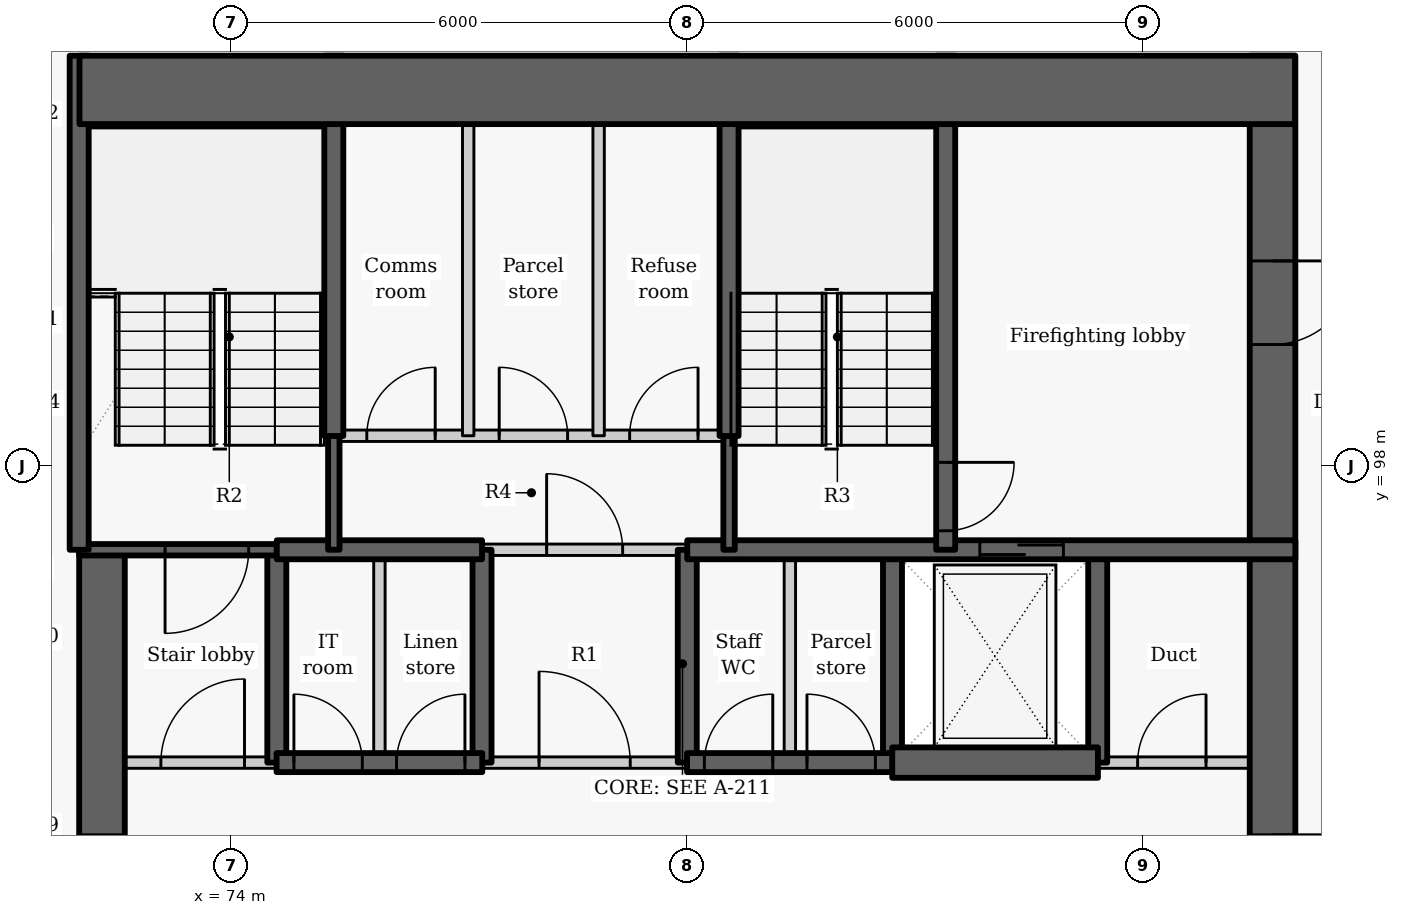
"""IFC4 building model, lengths in metres.
Left out: names, types, materials, properties, quantities, classifications, styles, units other than length and angle.
Written with IfcOpenShell. Run it as: python <this file> out.ifc"""

import sys

from ifc_helpers import new_model, si_unit, direction, frame, frame_2d, origin, place, context, subcontext, project, spatial, rectangle, extrude, element, fill, save


model = new_model("IFC4")
c1 = context("Model", 3, precision=1e-05, world=origin(), true_north=direction((0.0, 1.0)))
c2 = subcontext(c1, "Body", "Model", "MODEL_VIEW")
j1 = project(units=[si_unit("LENGTHUNIT", "METRE"), si_unit("PLANEANGLEUNIT", "RADIAN")], contexts=[c1])
p1 = place(None, origin())
s1 = spatial("IfcSite", under=j1, at=p1, CompositionType="ELEMENT")
p2 = place(p1, origin())
s2 = spatial("IfcBuilding", under=s1, at=p2, CompositionType="ELEMENT")
p3 = place(p2, frame((0.0, 0.0, 44.7)))
s3 = spatial("IfcBuildingStorey", under=s2, at=p3, CompositionType="ELEMENT", Elevation=44.7)
p4 = place(p3, frame((74.6, 94.1, -0.275), z_axis=(0.0, 0.0, 1.0), x_axis=(0.0, 1.0, 0.0)))
e1 = element("IfcWall", 1, at=p4, inside=s3, PredefinedType="SHEAR", context=c2, shape_type="SweptSolid", body=[
    extrude(rectangle(XDim=2.8, YDim=0.25, at=frame_2d((1.4, 0.0))), origin(), (0.0, 0.0, 1.0), 3.3),
])
p5 = place(p3, frame((72.3, 87.8, -0.275), z_axis=(0.0, 0.0, 1.0), x_axis=(0.0, 1.0, 0.0)))
e2 = element("IfcWall", 2, at=p5, inside=s3, PredefinedType="SHEAR", context=c2, shape_type="SweptSolid", body=[
    extrude(rectangle(XDim=9.1, YDim=0.6, at=frame_2d((4.55, 0.0))), origin(), (0.0, 0.0, 1.0), 3.3),
])
p6 = place(p5, frame((3.85, 0.0, 0.275)))
e3 = element("IfcOpeningElement", 3, at=p6, cuts=e2, PredefinedType="OPENING", context=c2, shape_type="SweptSolid", body=[
    extrude(rectangle(XDim=1.5, YDim=2.1, at=frame_2d((0.75, 1.05))), frame((0.0, 0.31, 0.0), z_axis=(0.0, -1.0, 0.0), x_axis=(1.0, 0.0, 0.0)), (0.0, 0.0, 1.0), 0.62),
])
for number, where, z_axis, x_axis in (
    (4, (77.3, 94.1, -0.275), (0.0, 0.0, 1.0), (0.0, 1.0, 0.0)),
    (5, (80.0, 94.1, -0.275), (0.0, 0.0, 1.0), (0.0, 1.0, 0.0)),
    (6, (82.7, 94.1, -0.275), (0.0, 0.0, 1.0), (0.0, 1.0, 0.0)),
    (7, (85.4, 94.1, -0.275), (0.0, 0.0, 1.0), (0.0, 1.0, 0.0)),
):
    element("IfcWall", number, at=place(p3, frame(where, z_axis=z_axis, x_axis=x_axis)), inside=s3, PredefinedType="SHEAR", context=c2, shape_type="SweptSolid", body=[
        extrude(rectangle(XDim=2.8, YDim=0.25, at=frame_2d((1.4, 0.0))), origin(), (0.0, 0.0, 1.0), 3.3),
    ])
p7 = place(p3, frame((87.7, 103.4, -0.275), z_axis=(0.0, 0.0, 1.0), x_axis=(0.0, -1.0, 0.0)))
e8 = element("IfcWall", 8, at=p7, inside=s3, PredefinedType="SHEAR", context=c2, shape_type="SweptSolid", body=[
    extrude(rectangle(XDim=15.6, YDim=0.6, at=frame_2d((7.8, 0.0))), origin(), (0.0, 0.0, 1.0), 3.3),
])
p8 = place(p7, frame((10.25, 0.0, 0.275)))
e9 = element("IfcOpeningElement", 9, at=p8, cuts=e8, PredefinedType="OPENING", context=c2, shape_type="SweptSolid", body=[
    extrude(rectangle(XDim=1.5, YDim=2.1, at=frame_2d((0.75, 1.05))), frame((0.0, 0.31, 0.0), z_axis=(0.0, -1.0, 0.0), x_axis=(1.0, 0.0, 0.0)), (0.0, 0.0, 1.0), 0.62),
])
p9 = place(p7, frame((2.7, 0.0, 0.275)))
e10 = element("IfcOpeningElement", 10, at=p9, cuts=e8, PredefinedType="OPENING", context=c2, shape_type="SweptSolid", body=[
    extrude(rectangle(XDim=1.1, YDim=2.1, at=frame_2d((0.55, 1.05))), frame((0.0, 0.31, 0.0), z_axis=(0.0, -1.0, 0.0), x_axis=(1.0, 0.0, 0.0)), (0.0, 0.0, 1.0), 0.62),
])
p10 = place(p3, frame((72.0, 94.1, 0.0), z_axis=(0.0, 0.0, 1.0), x_axis=(1.0, 0.0, 0.0)))
e11 = element("IfcWall", 11, at=p10, inside=s3, PredefinedType="PARTITIONING", context=c2, shape_type="SweptSolid", body=[
    extrude(rectangle(XDim=2.603, YDim=0.15, at=frame_2d((1.302, 0.0))), origin(), (0.0, 0.0, 1.0), 3.025),
])
p11 = place(p10, frame((1.075, 0.0, 0.0)))
e12 = element("IfcOpeningElement", 12, at=p11, cuts=e11, PredefinedType="OPENING", context=c2, shape_type="SweptSolid", body=[
    extrude(rectangle(XDim=1.1, YDim=2.1, at=frame_2d((0.55, 1.05))), frame((0.0, 0.085, 0.0), z_axis=(0.0, -1.0, 0.0), x_axis=(1.0, 0.0, 0.0)), (0.0, 0.0, 1.0), 0.17),
])
p12 = place(p3, frame((77.297, 94.1, 0.0), z_axis=(0.0, 0.0, 1.0), x_axis=(1.0, 0.0, 0.0)))
e13 = element("IfcWall", 13, at=p12, inside=s3, PredefinedType="PARTITIONING", context=c2, shape_type="SweptSolid", body=[
    extrude(rectangle(XDim=2.706, YDim=0.15, at=frame_2d((1.353, 0.0))), origin(), (0.0, 0.0, 1.0), 3.025),
])
p13 = place(p12, frame((0.753, 0.0, 0.0)))
e14 = element("IfcOpeningElement", 14, at=p13, cuts=e13, PredefinedType="OPENING", context=c2, shape_type="SweptSolid", body=[
    extrude(rectangle(XDim=1.2, YDim=2.1, at=frame_2d((0.6, 1.05))), frame((0.0, 0.085, 0.0), z_axis=(0.0, -1.0, 0.0), x_axis=(1.0, 0.0, 0.0)), (0.0, 0.0, 1.0), 0.17),
])
p14 = place(p3, frame((85.397, 94.1, 0.0), z_axis=(0.0, 0.0, 1.0), x_axis=(1.0, 0.0, 0.0)))
e15 = element("IfcWall", 15, at=p14, inside=s3, PredefinedType="PARTITIONING", context=c2, shape_type="SweptSolid", body=[
    extrude(rectangle(XDim=2.603, YDim=0.15, at=frame_2d((1.302, 0.0))), origin(), (0.0, 0.0, 1.0), 3.025),
])
p15 = place(p14, frame((0.528, 0.0, 0.0)))
e16 = element("IfcOpeningElement", 16, at=p15, cuts=e15, PredefinedType="OPENING", context=c2, shape_type="SweptSolid", body=[
    extrude(rectangle(XDim=0.9, YDim=2.1, at=frame_2d((0.45, 1.05))), frame((0.0, 0.085, 0.0), z_axis=(0.0, -1.0, 0.0), x_axis=(1.0, 0.0, 0.0)), (0.0, 0.0, 1.0), 0.17),
])
p16 = place(p3, frame((74.597, 94.1, -0.275), z_axis=(0.0, 0.0, 1.0), x_axis=(1.0, 0.0, 0.0)))
e17 = element("IfcWall", 17, at=p16, inside=s3, PredefinedType="SHEAR", context=c2, shape_type="SweptSolid", body=[
    extrude(rectangle(XDim=2.706, YDim=0.25, at=frame_2d((1.353, 0.0))), origin(), (0.0, 0.0, 1.0), 3.3),
])
p17 = place(p16, frame((0.228, 0.0, 0.275)))
e18 = element("IfcOpeningElement", 18, at=p17, cuts=e17, PredefinedType="OPENING", context=c2, shape_type="SweptSolid", body=[
    extrude(rectangle(XDim=0.9, YDim=2.1, at=frame_2d((0.45, 1.05))), frame((0.0, 0.135, 0.0), z_axis=(0.0, -1.0, 0.0), x_axis=(1.0, 0.0, 0.0)), (0.0, 0.0, 1.0), 0.27),
])
p18 = place(p16, frame((1.578, 0.0, 0.275)))
e19 = element("IfcOpeningElement", 19, at=p18, cuts=e17, PredefinedType="OPENING", context=c2, shape_type="SweptSolid", body=[
    extrude(rectangle(XDim=0.9, YDim=2.1, at=frame_2d((0.45, 1.05))), frame((0.0, 0.135, 0.0), z_axis=(0.0, -1.0, 0.0), x_axis=(1.0, 0.0, 0.0)), (0.0, 0.0, 1.0), 0.27),
])
p19 = place(p3, frame((79.997, 94.1, -0.275), z_axis=(0.0, 0.0, 1.0), x_axis=(1.0, 0.0, 0.0)))
e20 = element("IfcWall", 20, at=p19, inside=s3, PredefinedType="SHEAR", context=c2, shape_type="SweptSolid", body=[
    extrude(rectangle(XDim=2.706, YDim=0.25, at=frame_2d((1.353, 0.0))), origin(), (0.0, 0.0, 1.0), 3.3),
])
p20 = place(p19, frame((0.228, 0.0, 0.275)))
e21 = element("IfcOpeningElement", 21, at=p20, cuts=e20, PredefinedType="OPENING", context=c2, shape_type="SweptSolid", body=[
    extrude(rectangle(XDim=0.9, YDim=2.1, at=frame_2d((0.45, 1.05))), frame((0.0, 0.135, 0.0), z_axis=(0.0, -1.0, 0.0), x_axis=(1.0, 0.0, 0.0)), (0.0, 0.0, 1.0), 0.27),
])
p21 = place(p19, frame((1.578, 0.0, 0.275)))
e22 = element("IfcOpeningElement", 22, at=p21, cuts=e20, PredefinedType="OPENING", context=c2, shape_type="SweptSolid", body=[
    extrude(rectangle(XDim=0.9, YDim=2.1, at=frame_2d((0.45, 1.05))), frame((0.0, 0.135, 0.0), z_axis=(0.0, -1.0, 0.0), x_axis=(1.0, 0.0, 0.0)), (0.0, 0.0, 1.0), 0.27),
])
p22 = place(p3, frame((82.697, 94.1, -0.275), z_axis=(0.0, 0.0, 1.0), x_axis=(1.0, 0.0, 0.0)))
e23 = element("IfcWall", 23, at=p22, inside=s3, PredefinedType="SHEAR", context=c2, shape_type="SweptSolid", body=[
    extrude(rectangle(XDim=2.706, YDim=0.4, at=frame_2d((1.353, 0.0))), origin(), (0.0, 0.0, 1.0), 3.3),
])
p23 = place(p3, frame((74.6, 96.9, -0.275), z_axis=(0.0, 0.0, 1.0), x_axis=(-1.0, 0.0, 0.0)))
e24 = element("IfcWall", 24, at=p23, inside=s3, PredefinedType="SHEAR", context=c2, shape_type="SweptSolid", body=[
    extrude(rectangle(XDim=2.6, YDim=0.15, at=frame_2d((1.3, 0.0))), origin(), (0.0, 0.0, 1.0), 3.3),
])
p24 = place(p23, frame((0.37, 0.0, 0.275)))
e25 = element("IfcOpeningElement", 25, at=p24, cuts=e24, PredefinedType="OPENING", context=c2, shape_type="SweptSolid", body=[
    extrude(rectangle(XDim=1.1, YDim=2.1, at=frame_2d((0.55, 1.05))), frame((0.0, 0.085, 0.0), z_axis=(0.0, -1.0, 0.0), x_axis=(1.0, 0.0, 0.0)), (0.0, 0.0, 1.0), 0.17),
])
p25 = place(p3, frame((75.95, 94.1, 0.0), z_axis=(0.0, 0.0, 1.0), x_axis=(0.0, 1.0, 0.0)))
e26 = element("IfcWall", 26, at=p25, inside=s3, PredefinedType="PARTITIONING", context=c2, shape_type="SweptSolid", body=[
    extrude(rectangle(XDim=2.8, YDim=0.15, at=frame_2d((1.4, 0.0))), origin(), (0.0, 0.0, 1.0), 3.025),
])
p26 = place(p3, frame((74.6, 96.9, -0.275), z_axis=(0.0, 0.0, 1.0), x_axis=(1.0, 0.0, 0.0)))
e27 = element("IfcWall", 27, at=p26, inside=s3, PredefinedType="SHEAR", context=c2, shape_type="SweptSolid", body=[
    extrude(rectangle(XDim=2.7, YDim=0.25, at=frame_2d((1.35, 0.0))), origin(), (0.0, 0.0, 1.0), 3.3),
])
p27 = place(p3, frame((80.0, 96.9, -0.275), z_axis=(0.0, 0.0, 1.0), x_axis=(1.0, 0.0, 0.0)))
e28 = element("IfcWall", 28, at=p27, inside=s3, PredefinedType="SHEAR", context=c2, shape_type="SweptSolid", body=[
    extrude(rectangle(XDim=8.0, YDim=0.25, at=frame_2d((4.0, 0.0))), origin(), (0.0, 0.0, 1.0), 3.3),
])
p28 = place(p27, frame((3.849, 0.0, 0.275)))
e29 = element("IfcOpeningElement", 29, at=p28, cuts=e28, PredefinedType="OPENING", context=c2, shape_type="SweptSolid", body=[
    extrude(rectangle(XDim=1.1, YDim=2.1, at=frame_2d((0.55, 1.05))), frame((0.0, 0.135, 0.0), z_axis=(0.0, -1.0, 0.0), x_axis=(1.0, 0.0, 0.0)), (0.0, 0.0, 1.0), 0.27),
])
p29 = place(p3, frame((77.3, 96.9, 0.0), z_axis=(0.0, 0.0, 1.0), x_axis=(1.0, 0.0, 0.0)))
e30 = element("IfcWall", 30, at=p29, inside=s3, PredefinedType="PARTITIONING", context=c2, shape_type="SweptSolid", body=[
    extrude(rectangle(XDim=2.7, YDim=0.15, at=frame_2d((1.35, 0.0))), origin(), (0.0, 0.0, 1.0), 3.025),
])
p30 = place(p29, frame((0.85, 0.0, 0.0)))
e31 = element("IfcOpeningElement", 31, at=p30, cuts=e30, PredefinedType="OPENING", context=c2, shape_type="SweptSolid", body=[
    extrude(rectangle(XDim=1.0, YDim=2.1, at=frame_2d((0.5, 1.05))), frame((0.0, 0.085, 0.0), z_axis=(0.0, -1.0, 0.0), x_axis=(1.0, 0.0, 0.0)), (0.0, 0.0, 1.0), 0.17),
])
p31 = place(p3, frame((81.35, 94.1, 0.0), z_axis=(0.0, 0.0, 1.0), x_axis=(0.0, 1.0, 0.0)))
e32 = element("IfcWall", 32, at=p31, inside=s3, PredefinedType="PARTITIONING", context=c2, shape_type="SweptSolid", body=[
    extrude(rectangle(XDim=2.8, YDim=0.15, at=frame_2d((1.4, 0.0))), origin(), (0.0, 0.0, 1.0), 3.025),
])
p32 = place(p3, frame((75.35, 96.9, -0.275), z_axis=(0.0, 0.0, 1.0), x_axis=(0.0, 1.0, 0.0)))
e33 = element("IfcWall", 33, at=p32, inside=s3, PredefinedType="SHEAR", context=c2, shape_type="SweptSolid", body=[
    extrude(rectangle(XDim=1.503, YDim=0.15, at=frame_2d((0.751, 0.0))), origin(), (0.0, 0.0, 1.0), 3.3),
])
p33 = place(p3, frame((75.35, 98.397, -0.275), z_axis=(0.0, 0.0, 1.0), x_axis=(0.0, 1.0, 0.0)))
e34 = element("IfcWall", 34, at=p33, inside=s3, PredefinedType="SHEAR", context=c2, shape_type="SweptSolid", body=[
    extrude(rectangle(XDim=5.003, YDim=0.25, at=frame_2d((2.501, 0.0))), origin(), (0.0, 0.0, 1.0), 3.3),
])
p34 = place(p3, frame((72.0, 96.9, -0.275), z_axis=(0.0, 0.0, 1.0), x_axis=(0.0, 1.0, 0.0)))
e35 = element("IfcWall", 35, at=p34, inside=s3, PredefinedType="SHEAR", context=c2, shape_type="SweptSolid", body=[
    extrude(rectangle(XDim=6.5, YDim=0.25, at=frame_2d((3.25, 0.0))), origin(), (0.0, 0.0, 1.0), 3.3),
])
p35 = place(p3, frame((83.4, 103.4, -0.275), z_axis=(0.0, 0.0, 1.0), x_axis=(0.0, -1.0, 0.0)))
e36 = element("IfcWall", 36, at=p35, inside=s3, PredefinedType="SHEAR", context=c2, shape_type="SweptSolid", body=[
    extrude(rectangle(XDim=6.5, YDim=0.25, at=frame_2d((3.25, 0.0))), origin(), (0.0, 0.0, 1.0), 3.3),
])
p36 = place(p35, frame((5.35, 0.0, 0.275)))
e37 = element("IfcOpeningElement", 37, at=p36, cuts=e36, PredefinedType="OPENING", context=c2, shape_type="SweptSolid", body=[
    extrude(rectangle(XDim=0.9, YDim=2.1, at=frame_2d((0.45, 1.05))), frame((0.0, 0.135, 0.0), z_axis=(0.0, -1.0, 0.0), x_axis=(1.0, 0.0, 0.0)), (0.0, 0.0, 1.0), 0.27),
])
p37 = place(p3, frame((80.55, 96.9, -0.275), z_axis=(0.0, 0.0, 1.0), x_axis=(0.0, 1.0, 0.0)))
e38 = element("IfcWall", 38, at=p37, inside=s3, PredefinedType="SHEAR", context=c2, shape_type="SweptSolid", body=[
    extrude(rectangle(XDim=1.503, YDim=0.15, at=frame_2d((0.751, 0.0))), origin(), (0.0, 0.0, 1.0), 3.3),
])
p38 = place(p3, frame((80.55, 98.397, -0.275), z_axis=(0.0, 0.0, 1.0), x_axis=(0.0, 1.0, 0.0)))
e39 = element("IfcWall", 39, at=p38, inside=s3, PredefinedType="SHEAR", context=c2, shape_type="SweptSolid", body=[
    extrude(rectangle(XDim=5.003, YDim=0.25, at=frame_2d((2.501, 0.0))), origin(), (0.0, 0.0, 1.0), 3.3),
])
p39 = place(p3, frame((75.35, 98.4, 0.0), z_axis=(0.0, 0.0, 1.0), x_axis=(1.0, 0.0, 0.0)))
e40 = element("IfcWall", 40, at=p39, inside=s3, PredefinedType="PARTITIONING", context=c2, shape_type="SweptSolid", body=[
    extrude(rectangle(XDim=5.2, YDim=0.15, at=frame_2d((2.6, 0.0))), origin(), (0.0, 0.0, 1.0), 3.025),
])
p40 = place(p39, frame((0.434, 0.0, 0.0)))
e41 = element("IfcOpeningElement", 41, at=p40, cuts=e40, PredefinedType="OPENING", context=c2, shape_type="SweptSolid", body=[
    extrude(rectangle(XDim=0.9, YDim=2.1, at=frame_2d((0.45, 1.05))), frame((0.0, 0.085, 0.0), z_axis=(0.0, -1.0, 0.0), x_axis=(1.0, 0.0, 0.0)), (0.0, 0.0, 1.0), 0.17),
])
p41 = place(p39, frame((2.176, 0.0, 0.0)))
e42 = element("IfcOpeningElement", 42, at=p41, cuts=e40, PredefinedType="OPENING", context=c2, shape_type="SweptSolid", body=[
    extrude(rectangle(XDim=0.9, YDim=2.1, at=frame_2d((0.45, 1.05))), frame((0.0, 0.085, 0.0), z_axis=(0.0, -1.0, 0.0), x_axis=(1.0, 0.0, 0.0)), (0.0, 0.0, 1.0), 0.17),
])
p42 = place(p39, frame((3.892, 0.0, 0.0)))
e43 = element("IfcOpeningElement", 43, at=p42, cuts=e40, PredefinedType="OPENING", context=c2, shape_type="SweptSolid", body=[
    extrude(rectangle(XDim=0.9, YDim=2.1, at=frame_2d((0.45, 1.05))), frame((0.0, 0.085, 0.0), z_axis=(0.0, -1.0, 0.0), x_axis=(1.0, 0.0, 0.0)), (0.0, 0.0, 1.0), 0.17),
])
for number, where, z_axis, x_axis in (
    (44, (77.118, 98.4, 0.0), (0.0, 0.0, 1.0), (0.0, 1.0, 0.0)),
    (45, (78.834, 98.4, 0.0), (0.0, 0.0, 1.0), (0.0, 1.0, 0.0)),
):
    element("IfcWall", number, at=place(p3, frame(where, z_axis=z_axis, x_axis=x_axis)), inside=s3, PredefinedType="PARTITIONING", context=c2, shape_type="SweptSolid", body=[
        extrude(rectangle(XDim=5.0, YDim=0.15, at=frame_2d((2.5, 0.0))), origin(), (0.0, 0.0, 1.0), 3.025),
    ])
p43 = place(p3, frame((72.004, 102.95, -0.275), z_axis=(0.0, 0.0, 1.0), x_axis=(1.0, 0.0, 0.0)))
e46 = element("IfcWall", 46, at=p43, inside=s3, PredefinedType="SHEAR", context=c2, shape_type="SweptSolid", body=[
    extrude(rectangle(XDim=15.992, YDim=0.9, at=frame_2d((7.996, 0.0))), origin(), (0.0, 0.0, 1.0), 3.3),
])
p44 = place(p11, origin())
e47 = element("IfcDoor", 47, at=p44, inside=s3, OperationType="SINGLE_SWING_RIGHT", PredefinedType="DOOR", context=c2, shape_type="SweptSolid", body=[
    extrude(rectangle(XDim=1.1, YDim=2.1, at=frame_2d((0.55, 1.05))), frame((0.0, 0.025, 0.0), z_axis=(0.0, -1.0, 0.0), x_axis=(1.0, 0.0, 0.0)), (0.0, 0.0, 1.0), 0.05),
])
fill(e12, e47)
p45 = place(p17, origin())
e48 = element("IfcDoor", 48, at=p45, inside=s3, OperationType="SINGLE_SWING_LEFT", PredefinedType="DOOR", context=c2, shape_type="SweptSolid", body=[
    extrude(rectangle(XDim=0.9, YDim=2.1, at=frame_2d((0.45, 1.05))), frame((0.0, 0.025, 0.0), z_axis=(0.0, -1.0, 0.0), x_axis=(1.0, 0.0, 0.0)), (0.0, 0.0, 1.0), 0.05),
])
fill(e18, e48)
p46 = place(p18, origin())
e49 = element("IfcDoor", 49, at=p46, inside=s3, OperationType="SINGLE_SWING_RIGHT", PredefinedType="DOOR", context=c2, shape_type="SweptSolid", body=[
    extrude(rectangle(XDim=0.9, YDim=2.1, at=frame_2d((0.45, 1.05))), frame((0.0, 0.025, 0.0), z_axis=(0.0, -1.0, 0.0), x_axis=(1.0, 0.0, 0.0)), (0.0, 0.0, 1.0), 0.05),
])
fill(e19, e49)
p47 = place(p13, origin())
e50 = element("IfcDoor", 50, at=p47, inside=s3, OperationType="DOUBLE_DOOR_SINGLE_SWING", PredefinedType="DOOR", context=c2, shape_type="SweptSolid", body=[
    extrude(rectangle(XDim=1.2, YDim=2.1, at=frame_2d((0.6, 1.05))), frame((0.0, 0.025, 0.0), z_axis=(0.0, -1.0, 0.0), x_axis=(1.0, 0.0, 0.0)), (0.0, 0.0, 1.0), 0.05),
])
fill(e14, e50)
p48 = place(p20, origin())
e51 = element("IfcDoor", 51, at=p48, inside=s3, OperationType="SINGLE_SWING_RIGHT", PredefinedType="DOOR", context=c2, shape_type="SweptSolid", body=[
    extrude(rectangle(XDim=0.9, YDim=2.1, at=frame_2d((0.45, 1.05))), frame((0.0, 0.025, 0.0), z_axis=(0.0, -1.0, 0.0), x_axis=(1.0, 0.0, 0.0)), (0.0, 0.0, 1.0), 0.05),
])
fill(e21, e51)
p49 = place(p21, origin())
e52 = element("IfcDoor", 52, at=p49, inside=s3, OperationType="SINGLE_SWING_LEFT", PredefinedType="DOOR", context=c2, shape_type="SweptSolid", body=[
    extrude(rectangle(XDim=0.9, YDim=2.1, at=frame_2d((0.45, 1.05))), frame((0.0, 0.025, 0.0), z_axis=(0.0, -1.0, 0.0), x_axis=(1.0, 0.0, 0.0)), (0.0, 0.0, 1.0), 0.05),
])
fill(e22, e52)
p50 = place(p28, origin())
e53 = element("IfcDoor", 53, at=p50, inside=s3, OperationType="SLIDING_TO_LEFT", PredefinedType="DOOR", context=c2, shape_type="SweptSolid", body=[
    extrude(rectangle(XDim=1.1, YDim=2.1, at=frame_2d((0.55, 1.05))), frame((0.0, 0.025, 0.0), z_axis=(0.0, -1.0, 0.0), x_axis=(1.0, 0.0, 0.0)), (0.0, 0.0, 1.0), 0.05),
])
fill(e29, e53)
p51 = place(p15, origin())
e54 = element("IfcDoor", 54, at=p51, inside=s3, OperationType="SINGLE_SWING_RIGHT", PredefinedType="DOOR", context=c2, shape_type="SweptSolid", body=[
    extrude(rectangle(XDim=0.9, YDim=2.1, at=frame_2d((0.45, 1.05))), frame((0.0, 0.025, 0.0), z_axis=(0.0, -1.0, 0.0), x_axis=(1.0, 0.0, 0.0)), (0.0, 0.0, 1.0), 0.05),
])
fill(e16, e54)
p52 = place(p30, origin())
e55 = element("IfcDoor", 55, at=p52, inside=s3, OperationType="SINGLE_SWING_LEFT", PredefinedType="DOOR", context=c2, shape_type="SweptSolid", body=[
    extrude(rectangle(XDim=1.0, YDim=2.1, at=frame_2d((0.5, 1.05))), frame((0.0, 0.025, 0.0), z_axis=(0.0, -1.0, 0.0), x_axis=(1.0, 0.0, 0.0)), (0.0, 0.0, 1.0), 0.05),
])
fill(e31, e55)
p53 = place(p40, origin())
e56 = element("IfcDoor", 56, at=p53, inside=s3, OperationType="SINGLE_SWING_RIGHT", PredefinedType="DOOR", context=c2, shape_type="SweptSolid", body=[
    extrude(rectangle(XDim=0.9, YDim=2.1, at=frame_2d((0.45, 1.05))), frame((0.0, 0.025, 0.0), z_axis=(0.0, -1.0, 0.0), x_axis=(1.0, 0.0, 0.0)), (0.0, 0.0, 1.0), 0.05),
])
fill(e41, e56)
p54 = place(p41, origin())
e57 = element("IfcDoor", 57, at=p54, inside=s3, OperationType="SINGLE_SWING_LEFT", PredefinedType="DOOR", context=c2, shape_type="SweptSolid", body=[
    extrude(rectangle(XDim=0.9, YDim=2.1, at=frame_2d((0.45, 1.05))), frame((0.0, 0.025, 0.0), z_axis=(0.0, -1.0, 0.0), x_axis=(1.0, 0.0, 0.0)), (0.0, 0.0, 1.0), 0.05),
])
fill(e42, e57)
p55 = place(p42, origin())
e58 = element("IfcDoor", 58, at=p55, inside=s3, OperationType="SINGLE_SWING_RIGHT", PredefinedType="DOOR", context=c2, shape_type="SweptSolid", body=[
    extrude(rectangle(XDim=0.9, YDim=2.1, at=frame_2d((0.45, 1.05))), frame((0.0, 0.025, 0.0), z_axis=(0.0, -1.0, 0.0), x_axis=(1.0, 0.0, 0.0)), (0.0, 0.0, 1.0), 0.05),
])
fill(e43, e58)
p56 = place(p24, origin())
e59 = element("IfcDoor", 59, at=p56, inside=s3, OperationType="SINGLE_SWING_RIGHT", PredefinedType="DOOR", context=c2, shape_type="SweptSolid", body=[
    extrude(rectangle(XDim=1.1, YDim=2.1, at=frame_2d((0.55, 1.05))), frame((0.0, 0.025, 0.0), z_axis=(0.0, -1.0, 0.0), x_axis=(1.0, 0.0, 0.0)), (0.0, 0.0, 1.0), 0.05),
])
fill(e25, e59)
p57 = place(p36, origin())
e60 = element("IfcDoor", 60, at=p57, inside=s3, OperationType="SINGLE_SWING_LEFT", PredefinedType="DOOR", context=c2, shape_type="SweptSolid", body=[
    extrude(rectangle(XDim=0.9, YDim=2.1, at=frame_2d((0.45, 1.05))), frame((0.0, 0.025, 0.0), z_axis=(0.0, -1.0, 0.0), x_axis=(1.0, 0.0, 0.0)), (0.0, 0.0, 1.0), 0.05),
])
fill(e37, e60)
p58 = place(p6, origin())
e61 = element("IfcDoor", 61, at=p58, inside=s3, OperationType="DOUBLE_DOOR_SINGLE_SWING", PredefinedType="DOOR", context=c2, shape_type="SweptSolid", body=[
    extrude(rectangle(XDim=1.5, YDim=2.1, at=frame_2d((0.75, 1.05))), frame((0.0, 0.025, 0.0), z_axis=(0.0, -1.0, 0.0), x_axis=(1.0, 0.0, 0.0)), (0.0, 0.0, 1.0), 0.05),
])
fill(e3, e61)
p59 = place(p9, origin())
e62 = element("IfcDoor", 62, at=p59, inside=s3, OperationType="SINGLE_SWING_LEFT", PredefinedType="DOOR", context=c2, shape_type="SweptSolid", body=[
    extrude(rectangle(XDim=1.1, YDim=2.1, at=frame_2d((0.55, 1.05))), frame((0.0, 0.025, 0.0), z_axis=(0.0, -1.0, 0.0), x_axis=(1.0, 0.0, 0.0)), (0.0, 0.0, 1.0), 0.05),
])
fill(e10, e62)
save(model, sys.argv[1])
